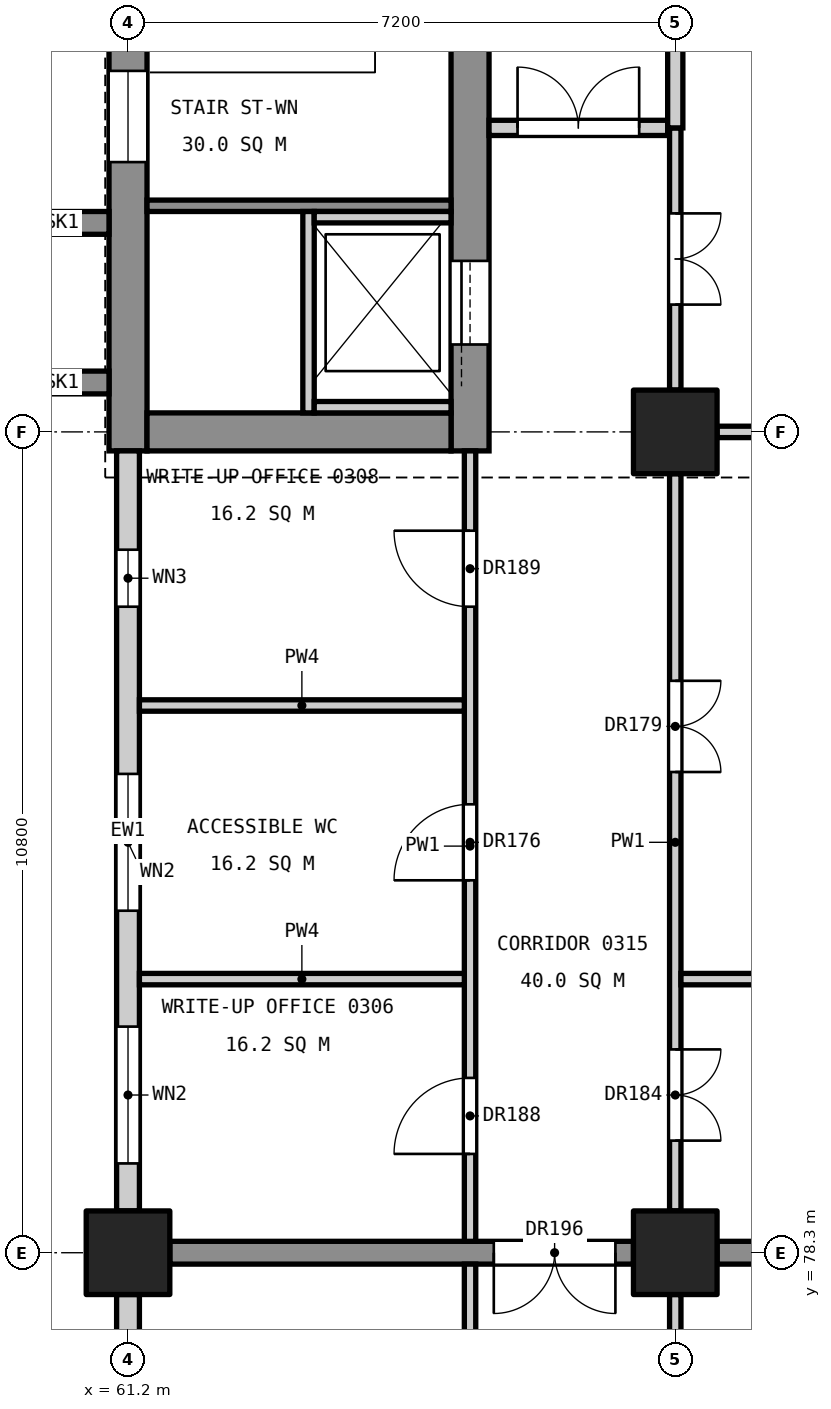
"""IFC4 building model, lengths in metres.
Left out: names, types, materials, properties, quantities, classifications, styles, units other than length and angle.
Written with IfcOpenShell. Run it as: python <this file> out.ifc"""

import sys

from ifc_helpers import new_model, si_unit, direction, frame, frame_2d, origin, origin_2d, place, context, subcontext, project, spatial, rectangle, extrude, element, fill, save


model = new_model("IFC4")
c1 = context("Model", 3, precision=1e-05, world=origin(), true_north=direction((0.0, 1.0)))
c2 = subcontext(c1, "Body", "Model", "MODEL_VIEW")
j1 = project(units=[si_unit("LENGTHUNIT", "METRE"), si_unit("PLANEANGLEUNIT", "RADIAN")], contexts=[c1])
p1 = place(None, origin())
s1 = spatial("IfcSite", under=j1, at=p1, CompositionType="ELEMENT")
p2 = place(p1, origin())
s2 = spatial("IfcBuilding", under=s1, at=p2, CompositionType="ELEMENT")
p3 = place(p2, frame((0.0, 0.0, 16.8)))
s3 = spatial("IfcBuildingStorey", under=s2, at=p3, CompositionType="ELEMENT", Elevation=16.8)
for number, where, z_axis, x_axis in (
    (1, (61.2, 78.3, 0.0), (0.0, 0.0, 1.0), (1.0, 0.0, 0.0)),
    (2, (68.4, 78.3, 0.0), (0.0, 0.0, 1.0), (1.0, 0.0, 0.0)),
    (3, (68.4, 89.1, 0.0), (0.0, 0.0, 1.0), (1.0, 0.0, 0.0)),
):
    element("IfcColumn", number, at=place(p3, frame(where, z_axis=z_axis, x_axis=x_axis)), inside=s3, PredefinedType="COLUMN", context=c2, shape_type="SweptSolid", body=[
        extrude(rectangle(XDim=1.1, YDim=1.1, at=origin_2d()), origin(), (0.0, 0.0, 1.0), 5.4),
    ])
p4 = place(p3, frame((61.2, 88.85, 0.0), z_axis=(0.0, 0.0, 1.0), x_axis=(0.0, 1.0, 0.0)))
e4 = element("IfcWall", 4, at=p4, inside=s3, PredefinedType="SHEAR", context=c2, shape_type="SweptSolid", body=[
    extrude(rectangle(XDim=11.3, YDim=0.5, at=frame_2d((5.65, 0.0))), origin(), (0.0, 0.0, 1.0), 5.15),
])
p5 = place(p4, frame((3.8, 0.0, 3.4)))
e5 = element("IfcOpeningElement", 5, at=p5, cuts=e4, PredefinedType="OPENING", context=c2, shape_type="SweptSolid", body=[
    extrude(rectangle(XDim=1.2, YDim=0.9, at=frame_2d((0.6, 0.45))), frame((0.0, 0.26, 0.0), z_axis=(0.0, -1.0, 0.0), x_axis=(1.0, 0.0, 0.0)), (0.0, 0.0, 1.0), 0.52),
])
p6 = place(p3, frame((65.7, 88.85, 0.0), z_axis=(0.0, 0.0, 1.0), x_axis=(0.0, 1.0, 0.0)))
e6 = element("IfcWall", 6, at=p6, inside=s3, PredefinedType="SHEAR", context=c2, shape_type="SweptSolid", body=[
    extrude(rectangle(XDim=11.3, YDim=0.5, at=frame_2d((5.65, 0.0))), origin(), (0.0, 0.0, 1.0), 5.15),
])
p7 = place(p6, frame((9.35, 0.0, 0.0)))
e7 = element("IfcOpeningElement", 7, at=p7, cuts=e6, PredefinedType="OPENING", context=c2, shape_type="SweptSolid", body=[
    extrude(rectangle(XDim=1.4, YDim=2.1, at=frame_2d((0.7, 1.05))), frame((0.0, 0.26, 0.0), z_axis=(0.0, -1.0, 0.0), x_axis=(1.0, 0.0, 0.0)), (0.0, 0.0, 1.0), 0.52),
])
p8 = place(p6, frame((1.4, 0.0, 0.0)))
e8 = element("IfcOpeningElement", 8, at=p8, cuts=e6, PredefinedType="OPENING", context=c2, shape_type="SweptSolid", body=[
    extrude(rectangle(XDim=1.1, YDim=2.1, at=frame_2d((0.55, 1.05))), frame((0.0, 0.26, 0.0), z_axis=(0.0, -1.0, 0.0), x_axis=(1.0, 0.0, 0.0)), (0.0, 0.0, 1.0), 0.52),
])
p9 = place(p3, frame((61.45, 89.1, 0.0), z_axis=(0.0, 0.0, 1.0), x_axis=(1.0, 0.0, 0.0)))
e9 = element("IfcWall", 9, at=p9, inside=s3, PredefinedType="SHEAR", context=c2, shape_type="SweptSolid", body=[
    extrude(rectangle(XDim=4.0, YDim=0.5, at=frame_2d((2.0, 0.0))), origin(), (0.0, 0.0, 1.0), 5.15),
])
for number, where, z_axis, x_axis in (
    (10, (60.95, 89.75, 0.0), (0.0, 0.0, 1.0), (-1.0, 0.0, 0.0)),
    (11, (60.95, 91.85, 0.0), (0.0, 0.0, 1.0), (-1.0, 0.0, 0.0)),
):
    element("IfcWall", number, at=place(p3, frame(where, z_axis=z_axis, x_axis=x_axis)), inside=s3, PredefinedType="SHEAR", context=c2, shape_type="SweptSolid", body=[
        extrude(rectangle(XDim=1.25, YDim=0.3, at=frame_2d((0.625, 0.0))), origin(), (0.0, 0.0, 1.0), 5.4),
    ])
p10 = place(p3, frame((61.75, 78.3, 0.0), z_axis=(0.0, 0.0, 1.0), x_axis=(1.0, 0.0, 0.0)))
e12 = element("IfcWall", 12, at=p10, inside=s3, PredefinedType="SHEAR", context=c2, shape_type="SweptSolid", body=[
    extrude(rectangle(XDim=6.1, YDim=0.3, at=frame_2d((3.05, 0.0))), origin(), (0.0, 0.0, 1.0), 5.15),
])
p11 = place(p10, frame((4.262, 0.0, 0.0)))
e13 = element("IfcOpeningElement", 13, at=p11, cuts=e12, PredefinedType="OPENING", context=c2, shape_type="SweptSolid", body=[
    extrude(rectangle(XDim=1.6, YDim=2.1, at=frame_2d((0.8, 1.05))), frame((0.0, 0.16, 0.0), z_axis=(0.0, -1.0, 0.0), x_axis=(1.0, 0.0, 0.0)), (0.0, 0.0, 1.0), 0.32),
])
p12 = place(p3, frame((68.95, 78.3, 0.0), z_axis=(0.0, 0.0, 1.0), x_axis=(1.0, 0.0, 0.0)))
e14 = element("IfcWall", 14, at=p12, inside=s3, PredefinedType="SHEAR", context=c2, shape_type="SweptSolid", body=[
    extrude(rectangle(XDim=9.7, YDim=0.3, at=frame_2d((4.85, 0.0))), origin(), (0.0, 0.0, 1.0), 5.15),
])
p13 = place(p3, frame((61.45, 92.075, 0.0), z_axis=(0.0, 0.0, 1.0), x_axis=(1.0, 0.0, 0.0)))
e15 = element("IfcWall", 15, at=p13, inside=s3, PredefinedType="SOLIDWALL", context=c2, shape_type="SweptSolid", body=[
    extrude(rectangle(XDim=4.0, YDim=0.15, at=frame_2d((2.0, 0.0))), origin(), (0.0, 0.0, 1.0), 5.15),
])
p14 = place(p3, frame((63.575, 92.0, 0.0), z_axis=(0.0, 0.0, 1.0), x_axis=(0.0, -1.0, 0.0)))
e16 = element("IfcWall", 16, at=p14, inside=s3, PredefinedType="SOLIDWALL", context=c2, shape_type="SweptSolid", body=[
    extrude(rectangle(XDim=2.65, YDim=0.15, at=frame_2d((1.325, 0.0))), origin(), (0.0, 0.0, 1.0), 5.4),
])
for number, where, z_axis, x_axis in (
    (17, (63.65, 91.925, 0.0), (0.0, 0.0, 1.0), (1.0, 0.0, 0.0)),
    (18, (63.65, 89.425, 0.0), (0.0, 0.0, 1.0), (1.0, 0.0, 0.0)),
):
    element("IfcWall", number, at=place(p3, frame(where, z_axis=z_axis, x_axis=x_axis)), inside=s3, PredefinedType="SOLIDWALL", context=c2, shape_type="SweptSolid", body=[
        extrude(rectangle(XDim=1.8, YDim=0.15, at=frame_2d((0.9, 0.0))), origin(), (0.0, 0.0, 1.0), 5.4),
    ])
p15 = place(p3, frame((61.2, 74.95, 0.0), z_axis=(0.0, 0.0, 1.0), x_axis=(0.0, 1.0, 0.0)))
e19 = element("IfcWall", 19, at=p15, inside=s3, PredefinedType="STANDARD", context=c2, shape_type="SweptSolid", body=[
    extrude(rectangle(XDim=2.8, YDim=0.3, at=frame_2d((1.4, 0.0))), origin(), (0.0, 0.0, 1.0), 4.25),
])
p16 = place(p15, frame((1.025, 0.0, 0.8)))
e20 = element("IfcOpeningElement", 20, at=p16, cuts=e19, PredefinedType="OPENING", context=c2, shape_type="SweptSolid", body=[
    extrude(rectangle(XDim=0.75, YDim=1.2, at=frame_2d((0.375, 0.6))), frame((0.0, 0.16, 0.0), z_axis=(0.0, -1.0, 0.0), x_axis=(1.0, 0.0, 0.0)), (0.0, 0.0, 1.0), 0.32),
])
p17 = place(p3, frame((61.2, 78.85, 0.0), z_axis=(0.0, 0.0, 1.0), x_axis=(0.0, 1.0, 0.0)))
e21 = element("IfcWall", 21, at=p17, inside=s3, PredefinedType="STANDARD", context=c2, shape_type="SweptSolid", body=[
    extrude(rectangle(XDim=10.0, YDim=0.3, at=frame_2d((5.0, 0.0))), origin(), (0.0, 0.0, 1.0), 4.25),
])
p18 = place(p17, frame((0.625, 0.0, 0.9)))
e22 = element("IfcOpeningElement", 22, at=p18, cuts=e21, PredefinedType="OPENING", context=c2, shape_type="SweptSolid", body=[
    extrude(rectangle(XDim=1.8, YDim=3.0, at=frame_2d((0.9, 1.5))), frame((0.0, 0.16, 0.0), z_axis=(0.0, -1.0, 0.0), x_axis=(1.0, 0.0, 0.0)), (0.0, 0.0, 1.0), 0.32),
])
p19 = place(p17, frame((3.95, 0.0, 0.9)))
e23 = element("IfcOpeningElement", 23, at=p19, cuts=e21, PredefinedType="OPENING", context=c2, shape_type="SweptSolid", body=[
    extrude(rectangle(XDim=1.8, YDim=3.0, at=frame_2d((0.9, 1.5))), frame((0.0, 0.16, 0.0), z_axis=(0.0, -1.0, 0.0), x_axis=(1.0, 0.0, 0.0)), (0.0, 0.0, 1.0), 0.32),
])
p20 = place(p17, frame((7.95, 0.0, 0.8)))
e24 = element("IfcOpeningElement", 24, at=p20, cuts=e21, PredefinedType="OPENING", context=c2, shape_type="SweptSolid", body=[
    extrude(rectangle(XDim=0.75, YDim=1.2, at=frame_2d((0.375, 0.6))), frame((0.0, 0.16, 0.0), z_axis=(0.0, -1.0, 0.0), x_axis=(1.0, 0.0, 0.0)), (0.0, 0.0, 1.0), 0.32),
])
p21 = place(p3, frame((65.7, 74.95, 0.0), z_axis=(0.0, 0.0, 1.0), x_axis=(0.0, 1.0, 0.0)))
e25 = element("IfcWall", 25, at=p21, inside=s3, PredefinedType="PARTITIONING", context=c2, shape_type="SweptSolid", body=[
    extrude(rectangle(XDim=3.2, YDim=0.15, at=frame_2d((1.6, 0.0))), origin(), (0.0, 0.0, 1.0), 4.05),
])
p22 = place(p21, frame((1.05, 0.0, 0.0)))
e26 = element("IfcOpeningElement", 26, at=p22, cuts=e25, PredefinedType="OPENING", context=c2, shape_type="SweptSolid", body=[
    extrude(rectangle(XDim=1.0, YDim=2.1, at=frame_2d((0.5, 1.05))), frame((0.0, 0.085, 0.0), z_axis=(0.0, -1.0, 0.0), x_axis=(1.0, 0.0, 0.0)), (0.0, 0.0, 1.0), 0.17),
])
p23 = place(p3, frame((65.7, 78.45, 0.0), z_axis=(0.0, 0.0, 1.0), x_axis=(0.0, 1.0, 0.0)))
e27 = element("IfcWall", 27, at=p23, inside=s3, PredefinedType="PARTITIONING", context=c2, shape_type="SweptSolid", body=[
    extrude(rectangle(XDim=10.4, YDim=0.15, at=frame_2d((5.2, 0.0))), origin(), (0.0, 0.0, 1.0), 4.05),
])
p24 = place(p23, frame((4.75, 0.0, 0.0)))
e28 = element("IfcOpeningElement", 28, at=p24, cuts=e27, PredefinedType="OPENING", context=c2, shape_type="SweptSolid", body=[
    extrude(rectangle(XDim=1.0, YDim=2.1, at=frame_2d((0.5, 1.05))), frame((0.0, 0.085, 0.0), z_axis=(0.0, -1.0, 0.0), x_axis=(1.0, 0.0, 0.0)), (0.0, 0.0, 1.0), 0.17),
])
p25 = place(p23, frame((1.15, 0.0, 0.0)))
e29 = element("IfcOpeningElement", 29, at=p25, cuts=e27, PredefinedType="OPENING", context=c2, shape_type="SweptSolid", body=[
    extrude(rectangle(XDim=1.0, YDim=2.1, at=frame_2d((0.5, 1.05))), frame((0.0, 0.085, 0.0), z_axis=(0.0, -1.0, 0.0), x_axis=(1.0, 0.0, 0.0)), (0.0, 0.0, 1.0), 0.17),
])
p26 = place(p23, frame((8.35, 0.0, 0.0)))
e30 = element("IfcOpeningElement", 30, at=p26, cuts=e27, PredefinedType="OPENING", context=c2, shape_type="SweptSolid", body=[
    extrude(rectangle(XDim=1.0, YDim=2.1, at=frame_2d((0.5, 1.05))), frame((0.0, 0.085, 0.0), z_axis=(0.0, -1.0, 0.0), x_axis=(1.0, 0.0, 0.0)), (0.0, 0.0, 1.0), 0.17),
])
for number, where, z_axis, x_axis in (
    (31, (61.35, 81.9, 0.0), (0.0, 0.0, 1.0), (1.0, 0.0, 0.0)),
    (32, (61.35, 85.5, 0.0), (0.0, 0.0, 1.0), (1.0, 0.0, 0.0)),
):
    element("IfcWall", number, at=place(p3, frame(where, z_axis=z_axis, x_axis=x_axis)), inside=s3, PredefinedType="PARTITIONING", context=c2, shape_type="SweptSolid", body=[
        extrude(rectangle(XDim=4.275, YDim=0.15, at=frame_2d((2.137, 0.0))), origin(), (0.0, 0.0, 1.0), 4.05),
    ])
p27 = place(p3, frame((65.95, 93.1, 0.0), z_axis=(0.0, 0.0, 1.0), x_axis=(1.0, 0.0, 0.0)))
e33 = element("IfcWall", 33, at=p27, inside=s3, PredefinedType="PARTITIONING", context=c2, shape_type="SweptSolid", body=[
    extrude(rectangle(XDim=2.35, YDim=0.2, at=frame_2d((1.175, 0.0))), origin(), (0.0, 0.0, 1.0), 4.05),
])
p28 = place(p27, frame((0.375, 0.0, 0.0)))
e34 = element("IfcOpeningElement", 34, at=p28, cuts=e33, PredefinedType="OPENING", context=c2, shape_type="SweptSolid", body=[
    extrude(rectangle(XDim=1.6, YDim=2.1, at=frame_2d((0.8, 1.05))), frame((0.0, 0.11, 0.0), z_axis=(0.0, -1.0, 0.0), x_axis=(1.0, 0.0, 0.0)), (0.0, 0.0, 1.0), 0.22),
])
p29 = place(p3, frame((68.4, 70.8, 0.0), z_axis=(0.0, 0.0, 1.0), x_axis=(0.0, 1.0, 0.0)))
e35 = element("IfcWall", 35, at=p29, inside=s3, PredefinedType="PARTITIONING", context=c2, shape_type="SweptSolid", body=[
    extrude(rectangle(XDim=6.95, YDim=0.15, at=frame_2d((3.475, 0.0))), origin(), (0.0, 0.0, 1.0), 4.15),
])
p30 = place(p29, frame((2.875, 0.0, 0.0)))
e36 = element("IfcOpeningElement", 36, at=p30, cuts=e35, PredefinedType="OPENING", context=c2, shape_type="SweptSolid", body=[
    extrude(rectangle(XDim=1.2, YDim=2.1, at=frame_2d((0.6, 1.05))), frame((0.0, 0.085, 0.0), z_axis=(0.0, -1.0, 0.0), x_axis=(1.0, 0.0, 0.0)), (0.0, 0.0, 1.0), 0.17),
])
p31 = place(p3, frame((68.4, 78.85, 0.0), z_axis=(0.0, 0.0, 1.0), x_axis=(0.0, 1.0, 0.0)))
e37 = element("IfcWall", 37, at=p31, inside=s3, PredefinedType="PARTITIONING", context=c2, shape_type="SweptSolid", body=[
    extrude(rectangle(XDim=9.7, YDim=0.15, at=frame_2d((4.85, 0.0))), origin(), (0.0, 0.0, 1.0), 4.15),
])
p32 = place(p31, frame((5.775, 0.0, 0.0)))
e38 = element("IfcOpeningElement", 38, at=p32, cuts=e37, PredefinedType="OPENING", context=c2, shape_type="SweptSolid", body=[
    extrude(rectangle(XDim=1.2, YDim=2.1, at=frame_2d((0.6, 1.05))), frame((0.0, 0.085, 0.0), z_axis=(0.0, -1.0, 0.0), x_axis=(1.0, 0.0, 0.0)), (0.0, 0.0, 1.0), 0.17),
])
p33 = place(p31, frame((0.925, 0.0, 0.0)))
e39 = element("IfcOpeningElement", 39, at=p33, cuts=e37, PredefinedType="OPENING", context=c2, shape_type="SweptSolid", body=[
    extrude(rectangle(XDim=1.2, YDim=2.1, at=frame_2d((0.6, 1.05))), frame((0.0, 0.085, 0.0), z_axis=(0.0, -1.0, 0.0), x_axis=(1.0, 0.0, 0.0)), (0.0, 0.0, 1.0), 0.17),
])
p34 = place(p3, frame((68.4, 89.65, 0.0), z_axis=(0.0, 0.0, 1.0), x_axis=(0.0, 1.0, 0.0)))
e40 = element("IfcWall", 40, at=p34, inside=s3, PredefinedType="PARTITIONING", context=c2, shape_type="SweptSolid", body=[
    extrude(rectangle(XDim=3.45, YDim=0.15, at=frame_2d((1.725, 0.0))), origin(), (0.0, 0.0, 1.0), 4.15),
])
p35 = place(p34, frame((1.125, 0.0, 0.0)))
e41 = element("IfcOpeningElement", 41, at=p35, cuts=e40, PredefinedType="OPENING", context=c2, shape_type="SweptSolid", body=[
    extrude(rectangle(XDim=1.2, YDim=2.1, at=frame_2d((0.6, 1.05))), frame((0.0, 0.085, 0.0), z_axis=(0.0, -1.0, 0.0), x_axis=(1.0, 0.0, 0.0)), (0.0, 0.0, 1.0), 0.17),
])
p36 = place(p3, frame((68.4, 93.1, 0.0), z_axis=(0.0, 0.0, 1.0), x_axis=(0.0, 1.0, 0.0)))
e42 = element("IfcWall", 42, at=p36, inside=s3, PredefinedType="PARTITIONING", context=c2, shape_type="SweptSolid", body=[
    extrude(rectangle(XDim=6.25, YDim=0.2, at=frame_2d((3.125, 0.0))), origin(), (0.0, 0.0, 1.0), 4.15),
])
p37 = place(p3, frame((68.475, 81.9, 0.0), z_axis=(0.0, 0.0, 1.0), x_axis=(1.0, 0.0, 0.0)))
e43 = element("IfcWall", 43, at=p37, inside=s3, PredefinedType="PARTITIONING", context=c2, shape_type="SweptSolid", body=[
    extrude(rectangle(XDim=10.575, YDim=0.15, at=frame_2d((5.288, 0.0))), origin(), (0.0, 0.0, 1.0), 4.05),
])
p38 = place(p3, frame((68.95, 89.1, 0.0), z_axis=(0.0, 0.0, 1.0), x_axis=(1.0, 0.0, 0.0)))
e44 = element("IfcWall", 44, at=p38, inside=s3, PredefinedType="PARTITIONING", context=c2, shape_type="SweptSolid", body=[
    extrude(rectangle(XDim=9.7, YDim=0.15, at=frame_2d((4.85, 0.0))), origin(), (0.0, 0.0, 1.0), 4.05),
])
p39 = place(p8, origin())
e45 = element("IfcDoor", 45, at=p39, inside=s3, OperationType="SLIDING_TO_LEFT", PredefinedType="DOOR", context=c2, shape_type="SweptSolid", body=[
    extrude(rectangle(XDim=1.1, YDim=2.1, at=frame_2d((0.55, 1.05))), frame((0.0, 0.025, 0.0), z_axis=(0.0, -1.0, 0.0), x_axis=(1.0, 0.0, 0.0)), (0.0, 0.0, 1.0), 0.05),
])
fill(e8, e45)
p40 = place(p18, origin())
e46 = element("IfcWindow", 46, at=p40, inside=s3, PartitioningType="SINGLE_PANEL", PredefinedType="WINDOW", context=c2, shape_type="SweptSolid", body=[
    extrude(rectangle(XDim=1.8, YDim=3.0, at=frame_2d((0.9, 1.5))), frame((0.0, 0.03, 0.0), z_axis=(0.0, -1.0, 0.0), x_axis=(1.0, 0.0, 0.0)), (0.0, 0.0, 1.0), 0.06),
])
fill(e22, e46)
p41 = place(p19, origin())
e47 = element("IfcWindow", 47, at=p41, inside=s3, PartitioningType="SINGLE_PANEL", PredefinedType="WINDOW", context=c2, shape_type="SweptSolid", body=[
    extrude(rectangle(XDim=1.8, YDim=3.0, at=frame_2d((0.9, 1.5))), frame((0.0, 0.03, 0.0), z_axis=(0.0, -1.0, 0.0), x_axis=(1.0, 0.0, 0.0)), (0.0, 0.0, 1.0), 0.06),
])
fill(e23, e47)
p42 = place(p20, origin())
e48 = element("IfcWindow", 48, at=p42, inside=s3, PartitioningType="SINGLE_PANEL", PredefinedType="WINDOW", context=c2, shape_type="SweptSolid", body=[
    extrude(rectangle(XDim=0.75, YDim=1.2, at=frame_2d((0.375, 0.6))), frame((0.0, 0.03, 0.0), z_axis=(0.0, -1.0, 0.0), x_axis=(1.0, 0.0, 0.0)), (0.0, 0.0, 1.0), 0.06),
])
fill(e24, e48)
p43 = place(p5, origin())
e49 = element("IfcWindow", 49, at=p43, inside=s3, PartitioningType="SINGLE_PANEL", PredefinedType="WINDOW", context=c2, shape_type="SweptSolid", body=[
    extrude(rectangle(XDim=1.2, YDim=0.9, at=frame_2d((0.6, 0.45))), frame((0.0, 0.03, 0.0), z_axis=(0.0, -1.0, 0.0), x_axis=(1.0, 0.0, 0.0)), (0.0, 0.0, 1.0), 0.06),
])
fill(e5, e49)
p44 = place(p24, origin())
e50 = element("IfcDoor", 50, at=p44, inside=s3, OperationType="SINGLE_SWING_LEFT", PredefinedType="DOOR", context=c2, shape_type="SweptSolid", body=[
    extrude(rectangle(XDim=1.0, YDim=2.1, at=frame_2d((0.5, 1.05))), frame((0.0, 0.025, 0.0), z_axis=(0.0, -1.0, 0.0), x_axis=(1.0, 0.0, 0.0)), (0.0, 0.0, 1.0), 0.05),
])
fill(e28, e50)
p45 = place(p32, frame((1.2, 0.0, 0.0), z_axis=(0.0, 0.0, 1.0), x_axis=(-1.0, 0.0, 0.0)))
e51 = element("IfcDoor", 51, at=p45, inside=s3, OperationType="DOUBLE_DOOR_SINGLE_SWING", PredefinedType="DOOR", context=c2, shape_type="SweptSolid", body=[
    extrude(rectangle(XDim=1.2, YDim=2.1, at=frame_2d((0.6, 1.05))), frame((0.0, 0.025, 0.0), z_axis=(0.0, -1.0, 0.0), x_axis=(1.0, 0.0, 0.0)), (0.0, 0.0, 1.0), 0.05),
])
fill(e38, e51)
p46 = place(p33, frame((1.2, 0.0, 0.0), z_axis=(0.0, 0.0, 1.0), x_axis=(-1.0, 0.0, 0.0)))
e52 = element("IfcDoor", 52, at=p46, inside=s3, OperationType="DOUBLE_DOOR_SINGLE_SWING", PredefinedType="DOOR", context=c2, shape_type="SweptSolid", body=[
    extrude(rectangle(XDim=1.2, YDim=2.1, at=frame_2d((0.6, 1.05))), frame((0.0, 0.025, 0.0), z_axis=(0.0, -1.0, 0.0), x_axis=(1.0, 0.0, 0.0)), (0.0, 0.0, 1.0), 0.05),
])
fill(e39, e52)
p47 = place(p35, frame((1.2, 0.0, 0.0), z_axis=(0.0, 0.0, 1.0), x_axis=(-1.0, 0.0, 0.0)))
e53 = element("IfcDoor", 53, at=p47, inside=s3, OperationType="DOUBLE_DOOR_SINGLE_SWING", PredefinedType="DOOR", context=c2, shape_type="SweptSolid", body=[
    extrude(rectangle(XDim=1.2, YDim=2.1, at=frame_2d((0.6, 1.05))), frame((0.0, 0.025, 0.0), z_axis=(0.0, -1.0, 0.0), x_axis=(1.0, 0.0, 0.0)), (0.0, 0.0, 1.0), 0.05),
])
fill(e41, e53)
p48 = place(p25, origin())
e54 = element("IfcDoor", 54, at=p48, inside=s3, OperationType="SINGLE_SWING_LEFT", PredefinedType="DOOR", context=c2, shape_type="SweptSolid", body=[
    extrude(rectangle(XDim=1.0, YDim=2.1, at=frame_2d((0.5, 1.05))), frame((0.0, 0.025, 0.0), z_axis=(0.0, -1.0, 0.0), x_axis=(1.0, 0.0, 0.0)), (0.0, 0.0, 1.0), 0.05),
])
fill(e29, e54)
p49 = place(p26, origin())
e55 = element("IfcDoor", 55, at=p49, inside=s3, OperationType="SINGLE_SWING_RIGHT", PredefinedType="DOOR", context=c2, shape_type="SweptSolid", body=[
    extrude(rectangle(XDim=1.0, YDim=2.1, at=frame_2d((0.5, 1.05))), frame((0.0, 0.025, 0.0), z_axis=(0.0, -1.0, 0.0), x_axis=(1.0, 0.0, 0.0)), (0.0, 0.0, 1.0), 0.05),
])
fill(e30, e55)
p50 = place(p28, origin())
e56 = element("IfcDoor", 56, at=p50, inside=s3, OperationType="DOUBLE_DOOR_SINGLE_SWING", PredefinedType="DOOR", context=c2, shape_type="SweptSolid", body=[
    extrude(rectangle(XDim=1.6, YDim=2.1, at=frame_2d((0.8, 1.05))), frame((0.0, 0.025, 0.0), z_axis=(0.0, -1.0, 0.0), x_axis=(1.0, 0.0, 0.0)), (0.0, 0.0, 1.0), 0.05),
])
fill(e34, e56)
p51 = place(p11, frame((1.6, 0.0, 0.0), z_axis=(0.0, 0.0, 1.0), x_axis=(-1.0, 0.0, 0.0)))
e57 = element("IfcDoor", 57, at=p51, inside=s3, OperationType="DOUBLE_DOOR_SINGLE_SWING", PredefinedType="DOOR", context=c2, shape_type="SweptSolid", body=[
    extrude(rectangle(XDim=1.6, YDim=2.1, at=frame_2d((0.8, 1.05))), frame((0.0, 0.025, 0.0), z_axis=(0.0, -1.0, 0.0), x_axis=(1.0, 0.0, 0.0)), (0.0, 0.0, 1.0), 0.05),
])
fill(e13, e57)
save(model, sys.argv[1])
